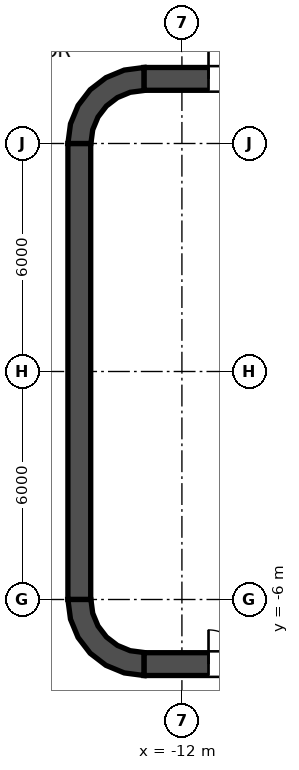
"""IFC4 building model, lengths in metres.
Left out: names, types, materials, properties, quantities, classifications, styles, units other than length and angle.
Written with IfcOpenShell. Run it as: python <this file> out.ifc"""

import sys

from ifc_helpers import new_model, si_unit, direction, frame, frame_2d, origin, place, context, subcontext, project, spatial, polyline, rectangle, outline, extrude, element, fill, save


model = new_model("IFC4")
c1 = context("Model", 3, precision=1e-05, world=origin(), true_north=direction((0.0, 1.0)))
c2 = subcontext(c1, "Body", "Model", "MODEL_VIEW")
j1 = project(units=[si_unit("LENGTHUNIT", "METRE"), si_unit("PLANEANGLEUNIT", "RADIAN")], contexts=[c1])
p1 = place(None, origin())
s1 = spatial("IfcSite", under=j1, at=p1, CompositionType="ELEMENT")
p2 = place(p1, origin())
s2 = spatial("IfcBuilding", under=s1, at=p2, CompositionType="ELEMENT")
p3 = place(p2, frame((0.0, 0.0, 106.2)))
s3 = spatial("IfcBuildingStorey", under=s2, at=p3, CompositionType="ELEMENT", Elevation=106.2)
p4 = place(p3, frame((-13.0, 7.7, 0.0), z_axis=(0.0, 0.0, 1.0), x_axis=(1.0, 0.0, 0.0)))
e1 = element("IfcWall", 1, at=p4, inside=s3, PredefinedType="SHEAR", context=c2, shape_type="SweptSolid", body=[
    extrude(rectangle(XDim=26.0, YDim=0.6, at=frame_2d((13.0, 0.0))), origin(), (0.0, 0.0, 1.0), 4.2),
])
p5 = place(p4, frame((1.7, 0.0, 0.0)))
e2 = element("IfcOpeningElement", 2, at=p5, cuts=e1, PredefinedType="OPENING", context=c2, shape_type="SweptSolid", body=[
    extrude(rectangle(XDim=1.8, YDim=2.1, at=frame_2d((0.9, 1.05))), frame((0.0, 0.3, 0.0), z_axis=(0.0, -1.0, 0.0), x_axis=(1.0, 0.0, 0.0)), (0.0, 0.0, 1.0), 0.6),
])
p6 = place(p4, frame((22.5, 0.0, 0.0)))
e3 = element("IfcOpeningElement", 3, at=p6, cuts=e1, PredefinedType="OPENING", context=c2, shape_type="SweptSolid", body=[
    extrude(rectangle(XDim=1.8, YDim=2.1, at=frame_2d((0.9, 1.05))), frame((0.0, 0.3, 0.0), z_axis=(0.0, -1.0, 0.0), x_axis=(1.0, 0.0, 0.0)), (0.0, 0.0, 1.0), 0.6),
])
p7 = place(p3, frame((-13.0, -7.7, 0.0), z_axis=(0.0, 0.0, 1.0), x_axis=(1.0, 0.0, 0.0)))
e4 = element("IfcWall", 4, at=p7, inside=s3, PredefinedType="SHEAR", context=c2, shape_type="SweptSolid", body=[
    extrude(rectangle(XDim=26.0, YDim=0.6, at=frame_2d((13.0, 0.0))), origin(), (0.0, 0.0, 1.0), 4.2),
])
p8 = place(p7, frame((1.7, 0.0, 0.0)))
e5 = element("IfcOpeningElement", 5, at=p8, cuts=e4, PredefinedType="OPENING", context=c2, shape_type="SweptSolid", body=[
    extrude(rectangle(XDim=1.8, YDim=2.1, at=frame_2d((0.9, 1.05))), frame((0.0, 0.3, 0.0), z_axis=(0.0, -1.0, 0.0), x_axis=(1.0, 0.0, 0.0)), (0.0, 0.0, 1.0), 0.6),
])
p9 = place(p7, frame((22.5, 0.0, 0.0)))
e6 = element("IfcOpeningElement", 6, at=p9, cuts=e4, PredefinedType="OPENING", context=c2, shape_type="SweptSolid", body=[
    extrude(rectangle(XDim=1.8, YDim=2.1, at=frame_2d((0.9, 1.05))), frame((0.0, 0.3, 0.0), z_axis=(0.0, -1.0, 0.0), x_axis=(1.0, 0.0, 0.0)), (0.0, 0.0, 1.0), 0.6),
])
p10 = place(p3, frame((-14.7, -6.0, 0.0), z_axis=(0.0, 0.0, 1.0), x_axis=(0.0, 1.0, 0.0)))
e7 = element("IfcWall", 7, at=p10, inside=s3, PredefinedType="SHEAR", context=c2, shape_type="SweptSolid", body=[
    extrude(rectangle(XDim=12.0, YDim=0.6, at=frame_2d((6.0, 0.0))), origin(), (0.0, 0.0, 1.0), 4.2),
])
p11 = place(p3, origin())
e8 = element("IfcWall", 8, at=p11, inside=s3, PredefinedType="SHEAR", context=c2, shape_type="SweptSolid", body=[
    extrude(outline(polyline([(-15.0, 6.0), (-14.395, 6.0), (-14.347, 6.361), (-14.208, 6.698), (-13.986, 6.986), (-13.698, 7.208), (-13.361, 7.347), (-13.0, 7.395), (-13.0, 8.0), (-13.518, 7.932), (-14.0, 7.732), (-14.414, 7.414), (-14.732, 7.0), (-14.932, 6.518), (-15.0, 6.0)])), origin(), (0.0, 0.0, 1.0), 4.2),
])
e9 = element("IfcWall", 9, at=p11, inside=s3, PredefinedType="SHEAR", context=c2, shape_type="SweptSolid", body=[
    extrude(outline(polyline([(-13.0, -8.0), (-13.0, -7.395), (-13.361, -7.347), (-13.698, -7.208), (-13.986, -6.986), (-14.208, -6.698), (-14.347, -6.361), (-14.395, -6.0), (-15.0, -6.0), (-14.932, -6.518), (-14.732, -7.0), (-14.414, -7.414), (-14.0, -7.732), (-13.518, -7.932), (-13.0, -8.0)])), origin(), (0.0, 0.0, 1.0), 4.2),
])
p12 = place(p3, frame((-11.8, -7.4, 0.0), z_axis=(0.0, 0.0, 1.0), x_axis=(0.0, 1.0, 0.0)))
e10 = element("IfcWall", 10, at=p12, inside=s3, PredefinedType="SOLIDWALL", context=c2, shape_type="SweptSolid", body=[
    extrude(rectangle(XDim=14.8, YDim=0.4, at=frame_2d((7.4, 0.0))), origin(), (0.0, 0.0, 1.0), 4.05),
])
p13 = place(p12, frame((11.2, 0.0, 0.0)))
e11 = element("IfcOpeningElement", 11, at=p13, cuts=e10, PredefinedType="OPENING", context=c2, shape_type="SweptSolid", body=[
    extrude(rectangle(XDim=1.1, YDim=2.1, at=frame_2d((0.55, 1.05))), frame((0.0, 0.2, 0.0), z_axis=(0.0, -1.0, 0.0), x_axis=(1.0, 0.0, 0.0)), (0.0, 0.0, 1.0), 0.4),
])
p14 = place(p12, frame((8.3, 0.0, 0.0)))
e12 = element("IfcOpeningElement", 12, at=p14, cuts=e10, PredefinedType="OPENING", context=c2, shape_type="SweptSolid", body=[
    extrude(rectangle(XDim=1.1, YDim=2.1, at=frame_2d((0.55, 1.05))), frame((0.0, 0.2, 0.0), z_axis=(0.0, -1.0, 0.0), x_axis=(1.0, 0.0, 0.0)), (0.0, 0.0, 1.0), 0.4),
])
p15 = place(p12, frame((5.4, 0.0, 0.0)))
e13 = element("IfcOpeningElement", 13, at=p15, cuts=e10, PredefinedType="OPENING", context=c2, shape_type="SweptSolid", body=[
    extrude(rectangle(XDim=1.1, YDim=2.1, at=frame_2d((0.55, 1.05))), frame((0.0, 0.2, 0.0), z_axis=(0.0, -1.0, 0.0), x_axis=(1.0, 0.0, 0.0)), (0.0, 0.0, 1.0), 0.4),
])
p16 = place(p12, frame((13.552, 0.0, 0.0)))
e14 = element("IfcOpeningElement", 14, at=p16, cuts=e10, PredefinedType="OPENING", context=c2, shape_type="SweptSolid", body=[
    extrude(rectangle(XDim=0.9, YDim=2.1, at=frame_2d((0.45, 1.05))), frame((0.0, 0.2, 0.0), z_axis=(0.0, -1.0, 0.0), x_axis=(1.0, 0.0, 0.0)), (0.0, 0.0, 1.0), 0.4),
])
p17 = place(p12, frame((0.347, 0.0, 0.0)))
e15 = element("IfcOpeningElement", 15, at=p17, cuts=e10, PredefinedType="OPENING", context=c2, shape_type="SweptSolid", body=[
    extrude(rectangle(XDim=0.9, YDim=2.1, at=frame_2d((0.45, 1.05))), frame((0.0, 0.2, 0.0), z_axis=(0.0, -1.0, 0.0), x_axis=(1.0, 0.0, 0.0)), (0.0, 0.0, 1.0), 0.4),
])
e16 = element("IfcWall", 16, at=p11, inside=s3, PredefinedType="SOLIDWALL", context=c2, shape_type="SweptSolid", body=[
    extrude(outline(polyline([(-12.0, -5.925), (-12.0, -5.675), (-14.15, -5.675), (-14.15, -3.025), (-12.0, -3.025), (-12.0, -2.775), (-14.15, -2.775), (-14.15, -0.125), (-12.0, -0.125), (-12.0, 0.125), (-14.15, 0.125), (-14.15, 2.775), (-12.0, 2.775), (-12.0, 3.025), (-14.15, 3.025), (-14.15, 5.675), (-12.0, 5.675), (-12.0, 5.925), (-14.15, 5.925), (-14.4, 5.925), (-14.4, 5.675), (-14.4, 3.025), (-14.4, 2.775), (-14.4, 0.125), (-14.4, -0.125), (-14.4, -2.775), (-14.4, -3.025), (-14.4, -5.675), (-14.4, -5.925), (-14.15, -5.925), (-12.0, -5.925)])), origin(), (0.0, 0.0, 1.0), 4.05),
])
p18 = place(p13, origin())
e17 = element("IfcDoor", 17, at=p18, inside=s3, OperationType="DOUBLE_DOOR_SLIDING", PredefinedType="DOOR", context=c2, shape_type="SweptSolid", body=[
    extrude(rectangle(XDim=1.1, YDim=2.1, at=frame_2d((0.55, 1.05))), frame((0.0, 0.025, 0.0), z_axis=(0.0, -1.0, 0.0), x_axis=(1.0, 0.0, 0.0)), (0.0, 0.0, 1.0), 0.05),
])
fill(e11, e17)
p19 = place(p14, origin())
e18 = element("IfcDoor", 18, at=p19, inside=s3, OperationType="DOUBLE_DOOR_SLIDING", PredefinedType="DOOR", context=c2, shape_type="SweptSolid", body=[
    extrude(rectangle(XDim=1.1, YDim=2.1, at=frame_2d((0.55, 1.05))), frame((0.0, 0.025, 0.0), z_axis=(0.0, -1.0, 0.0), x_axis=(1.0, 0.0, 0.0)), (0.0, 0.0, 1.0), 0.05),
])
fill(e12, e18)
p20 = place(p15, origin())
e19 = element("IfcDoor", 19, at=p20, inside=s3, OperationType="DOUBLE_DOOR_SLIDING", PredefinedType="DOOR", context=c2, shape_type="SweptSolid", body=[
    extrude(rectangle(XDim=1.1, YDim=2.1, at=frame_2d((0.55, 1.05))), frame((0.0, 0.025, 0.0), z_axis=(0.0, -1.0, 0.0), x_axis=(1.0, 0.0, 0.0)), (0.0, 0.0, 1.0), 0.05),
])
fill(e13, e19)
p21 = place(p16, origin())
e20 = element("IfcDoor", 20, at=p21, inside=s3, OperationType="SINGLE_SWING_LEFT", PredefinedType="DOOR", context=c2, shape_type="SweptSolid", body=[
    extrude(rectangle(XDim=0.9, YDim=2.1, at=frame_2d((0.45, 1.05))), frame((0.0, 0.025, 0.0), z_axis=(0.0, -1.0, 0.0), x_axis=(1.0, 0.0, 0.0)), (0.0, 0.0, 1.0), 0.05),
])
fill(e14, e20)
p22 = place(p17, origin())
e21 = element("IfcDoor", 21, at=p22, inside=s3, OperationType="SINGLE_SWING_LEFT", PredefinedType="DOOR", context=c2, shape_type="SweptSolid", body=[
    extrude(rectangle(XDim=0.9, YDim=2.1, at=frame_2d((0.45, 1.05))), frame((0.0, 0.025, 0.0), z_axis=(0.0, -1.0, 0.0), x_axis=(1.0, 0.0, 0.0)), (0.0, 0.0, 1.0), 0.05),
])
fill(e15, e21)
p23 = place(p5, origin())
e22 = element("IfcDoor", 22, at=p23, inside=s3, OperationType="DOUBLE_DOOR_SINGLE_SWING", PredefinedType="DOOR", context=c2, shape_type="SweptSolid", body=[
    extrude(rectangle(XDim=1.8, YDim=2.1, at=frame_2d((0.9, 1.05))), frame((0.0, 0.025, 0.0), z_axis=(0.0, -1.0, 0.0), x_axis=(1.0, 0.0, 0.0)), (0.0, 0.0, 1.0), 0.05),
])
fill(e2, e22)
p24 = place(p8, origin())
e23 = element("IfcDoor", 23, at=p24, inside=s3, OperationType="DOUBLE_DOOR_SINGLE_SWING", PredefinedType="DOOR", context=c2, shape_type="SweptSolid", body=[
    extrude(rectangle(XDim=1.8, YDim=2.1, at=frame_2d((0.9, 1.05))), frame((0.0, 0.025, 0.0), z_axis=(0.0, -1.0, 0.0), x_axis=(1.0, 0.0, 0.0)), (0.0, 0.0, 1.0), 0.05),
])
fill(e5, e23)
save(model, sys.argv[1])
